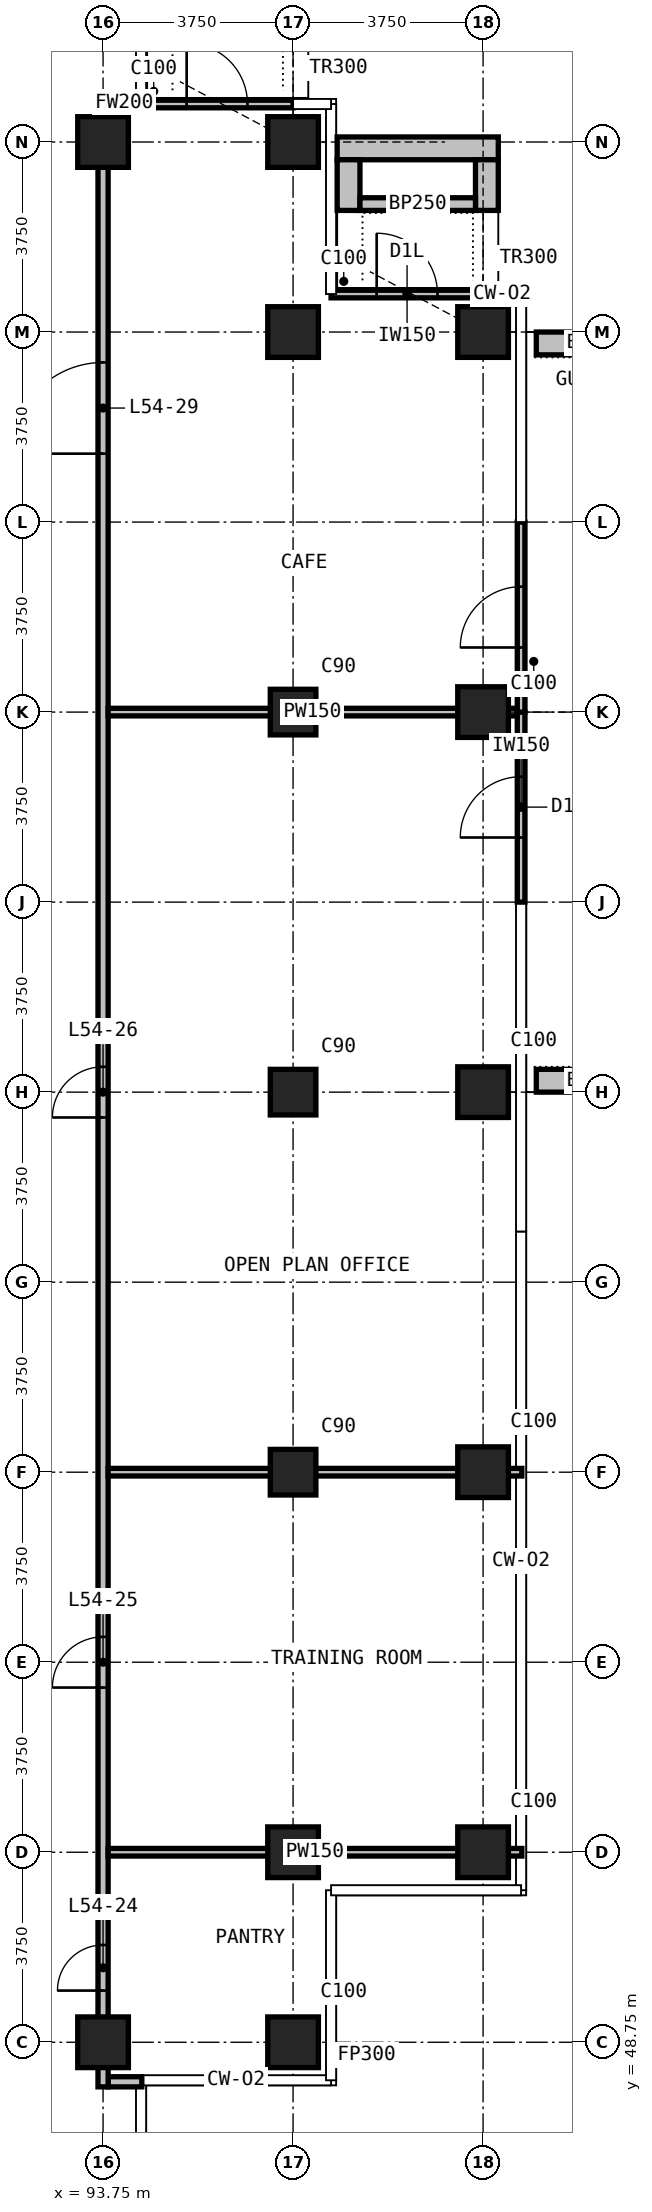
"""IFC4 building model, lengths in metres.
Left out: names, types, materials, properties, quantities, classifications, styles, units other than length and angle.
Written with IfcOpenShell. Run it as: python <this file> out.ifc"""

import sys

from ifc_helpers import new_model, si_unit, direction, frame, frame_2d, origin, origin_2d, place, context, subcontext, project, spatial, rectangle, extrude, element, fill, save


model = new_model("IFC4")
c1 = context("Model", 3, precision=1e-05, world=origin(), true_north=direction((0.0, 1.0)))
c2 = subcontext(c1, "Body", "Model", "MODEL_VIEW")
j1 = project(units=[si_unit("LENGTHUNIT", "METRE"), si_unit("PLANEANGLEUNIT", "RADIAN")], contexts=[c1])
p1 = place(None, origin())
s1 = spatial("IfcSite", under=j1, at=p1, CompositionType="ELEMENT")
p2 = place(p1, origin())
s2 = spatial("IfcBuilding", under=s1, at=p2, CompositionType="ELEMENT")
p3 = place(p2, frame((0.0, 0.0, 210.3)))
s3 = spatial("IfcBuildingStorey", under=s2, at=p3, CompositionType="ELEMENT", Elevation=210.3)
for number, where, z_axis, x_axis in (
    (1, (93.75, 48.75, 0.0), (0.0, 0.0, 1.0), (1.0, 0.0, 0.0)),
    (2, (93.75, 86.25, 0.0), (0.0, 0.0, 1.0), (1.0, 0.0, 0.0)),
    (3, (97.5, 48.75, 0.0), (0.0, 0.0, 1.0), (1.0, 0.0, 0.0)),
    (4, (97.5, 52.5, 0.0), (0.0, 0.0, 1.0), (1.0, 0.0, 0.0)),
):
    element("IfcColumn", number, at=place(p3, frame(where, z_axis=z_axis, x_axis=x_axis)), inside=s3, PredefinedType="COLUMN", context=c2, shape_type="SweptSolid", body=[
        extrude(rectangle(XDim=1.0, YDim=1.0, at=origin_2d()), origin(), (0.0, 0.0, 1.0), 3.6),
    ])
for number, where, z_axis, x_axis in (
    (5, (97.5, 60.0, 0.0), (0.0, 0.0, 1.0), (1.0, 0.0, 0.0)),
    (6, (97.5, 67.5, 0.0), (0.0, 0.0, 1.0), (1.0, 0.0, 0.0)),
    (7, (97.5, 75.0, 0.0), (0.0, 0.0, 1.0), (1.0, 0.0, 0.0)),
):
    element("IfcColumn", number, at=place(p3, frame(where, z_axis=z_axis, x_axis=x_axis)), inside=s3, PredefinedType="COLUMN", context=c2, shape_type="SweptSolid", body=[
        extrude(rectangle(XDim=0.9, YDim=0.9, at=origin_2d()), origin(), (0.0, 0.0, 1.0), 3.6),
    ])
for number, where, z_axis, x_axis in (
    (8, (97.5, 82.5, 0.0), (0.0, 0.0, 1.0), (1.0, 0.0, 0.0)),
    (9, (97.5, 86.25, 0.0), (0.0, 0.0, 1.0), (1.0, 0.0, 0.0)),
    (10, (101.25, 52.5, 0.0), (0.0, 0.0, 1.0), (1.0, 0.0, 0.0)),
    (11, (101.25, 60.0, 0.0), (0.0, 0.0, 1.0), (1.0, 0.0, 0.0)),
    (12, (101.25, 67.5, 0.0), (0.0, 0.0, 1.0), (1.0, 0.0, 0.0)),
    (13, (101.25, 75.0, 0.0), (0.0, 0.0, 1.0), (1.0, 0.0, 0.0)),
    (14, (101.25, 82.5, 0.0), (0.0, 0.0, 1.0), (1.0, 0.0, 0.0)),
):
    element("IfcColumn", number, at=place(p3, frame(where, z_axis=z_axis, x_axis=x_axis)), inside=s3, PredefinedType="COLUMN", context=c2, shape_type="SweptSolid", body=[
        extrude(rectangle(XDim=1.0, YDim=1.0, at=origin_2d()), origin(), (0.0, 0.0, 1.0), 3.6),
    ])
p4 = place(p3, frame((102.0, 71.25, 0.0), z_axis=(0.0, 0.0, 1.0), x_axis=(0.0, 1.0, 0.0)))
e15 = element("IfcWall", 15, at=p4, inside=s3, PredefinedType="SOLIDWALL", context=c2, shape_type="SweptSolid", body=[
    extrude(rectangle(XDim=3.75, YDim=0.15, at=frame_2d((1.875, 0.0))), origin(), (0.0, 0.0, 1.0), 3.3),
])
p5 = place(p4, frame((1.275, 0.0, 0.0)))
e16 = element("IfcOpeningElement", 16, at=p5, cuts=e15, PredefinedType="OPENING", context=c2, shape_type="SweptSolid", body=[
    extrude(rectangle(XDim=1.2, YDim=2.4, at=frame_2d((0.6, 1.2))), frame((0.0, 0.085, 0.0), z_axis=(0.0, -1.0, 0.0), x_axis=(1.0, 0.0, 0.0)), (0.0, 0.0, 1.0), 0.17),
])
p6 = place(p3, frame((102.0, 75.0, 0.0), z_axis=(0.0, 0.0, 1.0), x_axis=(0.0, 1.0, 0.0)))
e17 = element("IfcWall", 17, at=p6, inside=s3, PredefinedType="SOLIDWALL", context=c2, shape_type="SweptSolid", body=[
    extrude(rectangle(XDim=3.75, YDim=0.15, at=frame_2d((1.875, 0.0))), origin(), (0.0, 0.0, 1.0), 3.3),
])
p7 = place(p6, frame((1.275, 0.0, 0.0)))
e18 = element("IfcOpeningElement", 18, at=p7, cuts=e17, PredefinedType="OPENING", context=c2, shape_type="SweptSolid", body=[
    extrude(rectangle(XDim=1.2, YDim=2.4, at=frame_2d((0.6, 1.2))), frame((0.0, 0.085, 0.0), z_axis=(0.0, -1.0, 0.0), x_axis=(1.0, 0.0, 0.0)), (0.0, 0.0, 1.0), 0.17),
])
p8 = place(p3, frame((98.25, 83.25, 0.0), z_axis=(0.0, 0.0, 1.0), x_axis=(1.0, 0.0, 0.0)))
e19 = element("IfcWall", 19, at=p8, inside=s3, PredefinedType="SOLIDWALL", context=c2, shape_type="SweptSolid", body=[
    extrude(rectangle(XDim=3.0, YDim=0.15, at=frame_2d((1.5, 0.0))), origin(), (0.0, 0.0, 1.0), 3.3),
])
p9 = place(p8, frame((0.9, 0.0, 0.0)))
e20 = element("IfcOpeningElement", 20, at=p9, cuts=e19, PredefinedType="OPENING", context=c2, shape_type="SweptSolid", body=[
    extrude(rectangle(XDim=1.2, YDim=2.0, at=frame_2d((0.6, 1.0))), frame((0.0, 0.085, 0.0), z_axis=(0.0, -1.0, 0.0), x_axis=(1.0, 0.0, 0.0)), (0.0, 0.0, 1.0), 0.17),
])
p10 = place(p3, frame((94.5, 87.0, 0.0), z_axis=(0.0, 0.0, 1.0), x_axis=(1.0, 0.0, 0.0)))
e21 = element("IfcWall", 21, at=p10, inside=s3, PredefinedType="SOLIDWALL", context=c2, shape_type="SweptSolid", body=[
    extrude(rectangle(XDim=3.0, YDim=0.15, at=frame_2d((1.5, 0.0))), origin(), (0.0, 0.0, 1.0), 3.3),
])
p11 = place(p10, frame((0.9, 0.0, 0.0)))
e22 = element("IfcOpeningElement", 22, at=p11, cuts=e21, PredefinedType="OPENING", context=c2, shape_type="SweptSolid", body=[
    extrude(rectangle(XDim=1.2, YDim=2.0, at=frame_2d((0.6, 1.0))), frame((0.0, 0.085, 0.0), z_axis=(0.0, -1.0, 0.0), x_axis=(1.0, 0.0, 0.0)), (0.0, 0.0, 1.0), 0.17),
])
for number, where, z_axis, x_axis in (
    (23, (102.3, 67.725, 0.0), (0.0, 0.0, 1.0), (1.0, 0.0, 0.0)),
    (24, (102.3, 82.275, 0.0), (0.0, 0.0, 1.0), (1.0, 0.0, 0.0)),
):
    element("IfcWall", number, at=place(p3, frame(where, z_axis=z_axis, x_axis=x_axis)), inside=s3, PredefinedType="USERDEFINED", context=c2, shape_type="SweptSolid", body=[
        extrude(rectangle(XDim=2.35, YDim=0.45, at=frame_2d((1.175, 0.0))), origin(), (0.0, 0.0, 1.0), 1.1),
    ])
p12 = place(p3, frame((98.37, 86.125, 0.0), z_axis=(0.0, 0.0, 1.0), x_axis=(1.0, 0.0, 0.0)))
e25 = element("IfcWall", 25, at=p12, inside=s3, PredefinedType="USERDEFINED", context=c2, shape_type="SweptSolid", body=[
    extrude(rectangle(XDim=3.18, YDim=0.45, at=frame_2d((1.59, 0.0))), origin(), (0.0, 0.0, 1.0), 1.1),
])
for number, where, z_axis, x_axis in (
    (26, (98.595, 84.9, 0.0), (0.0, 0.0, 1.0), (0.0, 1.0, 0.0)),
    (27, (101.325, 84.9, 0.0), (0.0, 0.0, 1.0), (0.0, 1.0, 0.0)),
):
    element("IfcWall", number, at=place(p3, frame(where, z_axis=z_axis, x_axis=x_axis)), inside=s3, PredefinedType="USERDEFINED", context=c2, shape_type="SweptSolid", body=[
        extrude(rectangle(XDim=1.0, YDim=0.45, at=frame_2d((0.5, 0.0))), origin(), (0.0, 0.0, 1.0), 1.1),
    ])
p13 = place(p3, frame((98.82, 85.025, 0.0), z_axis=(0.0, 0.0, 1.0), x_axis=(1.0, 0.0, 0.0)))
e28 = element("IfcWall", 28, at=p13, inside=s3, PredefinedType="USERDEFINED", context=c2, shape_type="SweptSolid", body=[
    extrude(rectangle(XDim=2.28, YDim=0.25, at=frame_2d((1.14, 0.0))), origin(), (0.0, 0.0, 1.0), 1.0),
])
p14 = place(p3, frame((93.85, 47.97, 0.0), z_axis=(0.0, 0.0, 1.0), x_axis=(1.0, 0.0, 0.0)))
e29 = element("IfcWall", 29, at=p14, inside=s3, PredefinedType="PARTITIONING", context=c2, shape_type="SweptSolid", body=[
    extrude(rectangle(XDim=0.665, YDim=0.2, at=frame_2d((0.333, 0.0))), origin(), (0.0, 0.0, 1.0), 3.3),
])
p15 = place(p3, frame((93.85, 87.03, 0.0), z_axis=(0.0, 0.0, 1.0), x_axis=(1.0, 0.0, 0.0)))
e30 = element("IfcWall", 30, at=p15, inside=s3, PredefinedType="PARTITIONING", context=c2, shape_type="SweptSolid", body=[
    extrude(rectangle(XDim=0.64, YDim=0.2, at=frame_2d((0.32, 0.0))), origin(), (0.0, 0.0, 1.0), 3.3),
])
p16 = place(p3, frame((93.75, 47.87, 0.0), z_axis=(0.0, 0.0, 1.0), x_axis=(0.0, 1.0, 0.0)))
e31 = element("IfcWall", 31, at=p16, inside=s3, PredefinedType="PARTITIONING", context=c2, shape_type="SweptSolid", body=[
    extrude(rectangle(XDim=39.26, YDim=0.2, at=frame_2d((19.63, 0.0))), origin(), (0.0, 0.0, 1.0), 3.3),
])
p17 = place(p16, frame((1.9, 0.0, 0.0)))
e32 = element("IfcOpeningElement", 32, at=p17, cuts=e31, PredefinedType="OPENING", context=c2, shape_type="SweptSolid", body=[
    extrude(rectangle(XDim=0.9, YDim=2.2, at=frame_2d((0.45, 1.1))), frame((0.0, 0.11, 0.0), z_axis=(0.0, -1.0, 0.0), x_axis=(1.0, 0.0, 0.0)), (0.0, 0.0, 1.0), 0.22),
])
p18 = place(p16, frame((7.88, 0.0, 0.0)))
e33 = element("IfcOpeningElement", 33, at=p18, cuts=e31, PredefinedType="OPENING", context=c2, shape_type="SweptSolid", body=[
    extrude(rectangle(XDim=1.0, YDim=2.2, at=frame_2d((0.5, 1.1))), frame((0.0, 0.11, 0.0), z_axis=(0.0, -1.0, 0.0), x_axis=(1.0, 0.0, 0.0)), (0.0, 0.0, 1.0), 0.22),
])
p19 = place(p16, frame((19.13, 0.0, 0.0)))
e34 = element("IfcOpeningElement", 34, at=p19, cuts=e31, PredefinedType="OPENING", context=c2, shape_type="SweptSolid", body=[
    extrude(rectangle(XDim=1.0, YDim=2.2, at=frame_2d((0.5, 1.1))), frame((0.0, 0.11, 0.0), z_axis=(0.0, -1.0, 0.0), x_axis=(1.0, 0.0, 0.0)), (0.0, 0.0, 1.0), 0.22),
])
p20 = place(p16, frame((32.23, 0.0, 0.0)))
e35 = element("IfcOpeningElement", 35, at=p20, cuts=e31, PredefinedType="OPENING", context=c2, shape_type="SweptSolid", body=[
    extrude(rectangle(XDim=1.8, YDim=2.2, at=frame_2d((0.9, 1.1))), frame((0.0, 0.11, 0.0), z_axis=(0.0, -1.0, 0.0), x_axis=(1.0, 0.0, 0.0)), (0.0, 0.0, 1.0), 0.22),
])
for number, where, z_axis, x_axis in (
    (36, (93.85, 52.5, 0.0), (0.0, 0.0, 1.0), (1.0, 0.0, 0.0)),
    (37, (93.85, 60.0, 0.0), (0.0, 0.0, 1.0), (1.0, 0.0, 0.0)),
):
    element("IfcWall", number, at=place(p3, frame(where, z_axis=z_axis, x_axis=x_axis)), inside=s3, PredefinedType="PARTITIONING", context=c2, shape_type="SweptSolid", body=[
        extrude(rectangle(XDim=8.165, YDim=0.15, at=frame_2d((4.083, 0.0))), origin(), (0.0, 0.0, 1.0), 3.3),
    ])
p21 = place(p3, frame((93.85, 75.0, 0.0), z_axis=(0.0, 0.0, 1.0), x_axis=(1.0, 0.0, 0.0)))
e38 = element("IfcWall", 38, at=p21, inside=s3, PredefinedType="PARTITIONING", context=c2, shape_type="SweptSolid", body=[
    extrude(rectangle(XDim=8.065, YDim=0.15, at=frame_2d((4.032, 0.0))), origin(), (0.0, 0.0, 1.0), 3.3),
])
p22 = place(p5, origin())
e39 = element("IfcDoor", 39, at=p22, inside=s3, OperationType="SINGLE_SWING_LEFT", PredefinedType="DOOR", context=c2, shape_type="SweptSolid", body=[
    extrude(rectangle(XDim=1.2, YDim=2.4, at=frame_2d((0.6, 1.2))), frame((0.0, 0.025, 0.0), z_axis=(0.0, -1.0, 0.0), x_axis=(1.0, 0.0, 0.0)), (0.0, 0.0, 1.0), 0.05),
])
fill(e16, e39)
p23 = place(p7, origin())
e40 = element("IfcDoor", 40, at=p23, inside=s3, OperationType="SINGLE_SWING_LEFT", PredefinedType="DOOR", context=c2, shape_type="SweptSolid", body=[
    extrude(rectangle(XDim=1.2, YDim=2.4, at=frame_2d((0.6, 1.2))), frame((0.0, 0.025, 0.0), z_axis=(0.0, -1.0, 0.0), x_axis=(1.0, 0.0, 0.0)), (0.0, 0.0, 1.0), 0.05),
])
fill(e18, e40)
p24 = place(p9, origin())
e41 = element("IfcDoor", 41, at=p24, inside=s3, OperationType="SINGLE_SWING_LEFT", PredefinedType="DOOR", context=c2, shape_type="SweptSolid", body=[
    extrude(rectangle(XDim=1.2, YDim=2.0, at=frame_2d((0.6, 1.0))), frame((0.0, 0.025, 0.0), z_axis=(0.0, -1.0, 0.0), x_axis=(1.0, 0.0, 0.0)), (0.0, 0.0, 1.0), 0.05),
])
fill(e20, e41)
p25 = place(p11, origin())
e42 = element("IfcDoor", 42, at=p25, inside=s3, OperationType="SINGLE_SWING_LEFT", PredefinedType="DOOR", context=c2, shape_type="SweptSolid", body=[
    extrude(rectangle(XDim=1.2, YDim=2.0, at=frame_2d((0.6, 1.0))), frame((0.0, 0.025, 0.0), z_axis=(0.0, -1.0, 0.0), x_axis=(1.0, 0.0, 0.0)), (0.0, 0.0, 1.0), 0.05),
])
fill(e22, e42)
p26 = place(p17, origin())
e43 = element("IfcDoor", 43, at=p26, inside=s3, OperationType="SINGLE_SWING_RIGHT", PredefinedType="DOOR", context=c2, shape_type="SweptSolid", body=[
    extrude(rectangle(XDim=0.9, YDim=2.2, at=frame_2d((0.45, 1.1))), frame((0.0, 0.025, 0.0), z_axis=(0.0, -1.0, 0.0), x_axis=(1.0, 0.0, 0.0)), (0.0, 0.0, 1.0), 0.05),
])
fill(e32, e43)
p27 = place(p18, origin())
e44 = element("IfcDoor", 44, at=p27, inside=s3, OperationType="SINGLE_SWING_LEFT", PredefinedType="DOOR", context=c2, shape_type="SweptSolid", body=[
    extrude(rectangle(XDim=1.0, YDim=2.2, at=frame_2d((0.5, 1.1))), frame((0.0, 0.025, 0.0), z_axis=(0.0, -1.0, 0.0), x_axis=(1.0, 0.0, 0.0)), (0.0, 0.0, 1.0), 0.05),
])
fill(e33, e44)
p28 = place(p19, origin())
e45 = element("IfcDoor", 45, at=p28, inside=s3, OperationType="SINGLE_SWING_LEFT", PredefinedType="DOOR", context=c2, shape_type="SweptSolid", body=[
    extrude(rectangle(XDim=1.0, YDim=2.2, at=frame_2d((0.5, 1.1))), frame((0.0, 0.025, 0.0), z_axis=(0.0, -1.0, 0.0), x_axis=(1.0, 0.0, 0.0)), (0.0, 0.0, 1.0), 0.05),
])
fill(e34, e45)
p29 = place(p20, origin())
e46 = element("IfcDoor", 46, at=p29, inside=s3, OperationType="DOUBLE_DOOR_SINGLE_SWING", PredefinedType="DOOR", context=c2, shape_type="SweptSolid", body=[
    extrude(rectangle(XDim=1.8, YDim=2.2, at=frame_2d((0.9, 1.1))), frame((0.0, 0.025, 0.0), z_axis=(0.0, -1.0, 0.0), x_axis=(1.0, 0.0, 0.0)), (0.0, 0.0, 1.0), 0.05),
])
fill(e35, e46)
save(model, sys.argv[1])
